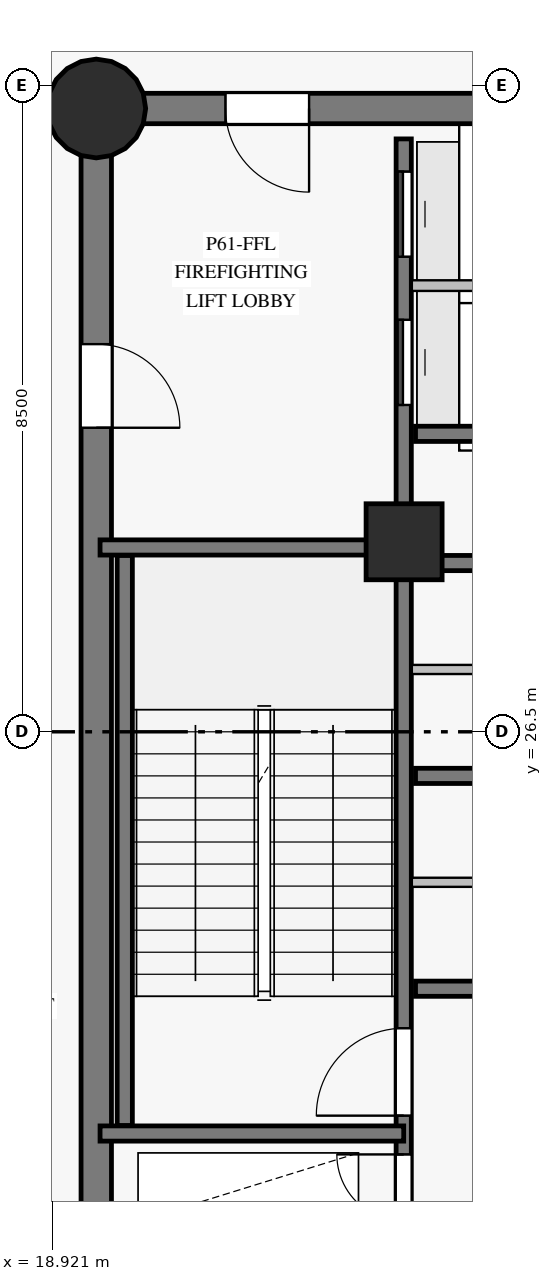
"""IFC4 building model, lengths in metres.
Left out: names, types, materials, properties, quantities, classifications, styles, units other than length and angle.
Written with IfcOpenShell. Run it as: python <this file> out.ifc"""

import sys

from ifc_helpers import new_model, si_unit, direction, frame, frame_2d, origin, origin_with_axes, origin_2d, place, context, subcontext, project, spatial, rectangle, circle, extrude, source, transform, mapped, element, fill, save


model = new_model("IFC4")
c1 = context("Model", 3, precision=1e-05, world=origin(), true_north=direction((0.0, 1.0)))
c2 = subcontext(c1, "Body", "Model", "MODEL_VIEW")
j1 = project(units=[si_unit("LENGTHUNIT", "METRE"), si_unit("PLANEANGLEUNIT", "RADIAN")], contexts=[c1])
p1 = place(None, origin())
s1 = spatial("IfcSite", under=j1, at=p1, CompositionType="ELEMENT")
p2 = place(p1, origin())
s2 = spatial("IfcBuilding", under=s1, at=p2, CompositionType="ELEMENT")
p3 = place(p2, frame((0.0, 0.0, 208.4)))
s3 = spatial("IfcBuildingStorey", under=s2, at=p3, CompositionType="ELEMENT", Elevation=208.4)
p4 = place(p3, frame((26.55, 34.7, 0.0), z_axis=(0.0, 0.0, 1.0), x_axis=(-1.0, 0.0, 0.0)))
e1 = element("IfcWall", 1, at=p4, inside=s3, PredefinedType="SHEAR", context=c2, shape_type="SweptSolid", body=[
    extrude(rectangle(XDim=7.05, YDim=0.4, at=frame_2d((3.525, 0.0))), origin(), (0.0, 0.0, 1.0), 4.3),
])
p5 = place(p4, frame((4.25, 0.0, 0.0)))
e2 = element("IfcOpeningElement", 2, at=p5, cuts=e1, PredefinedType="OPENING", context=c2, shape_type="SweptSolid", body=[
    extrude(rectangle(XDim=1.1, YDim=2.15, at=frame_2d((0.55, 1.075))), frame((0.0, 0.21, 0.0), z_axis=(0.0, -1.0, 0.0), x_axis=(1.0, 0.0, 0.0)), (0.0, 0.0, 1.0), 0.42),
])
p6 = place(p3, frame((19.5, 34.7, 0.0), z_axis=(0.0, 0.0, 1.0), x_axis=(0.0, -1.0, 0.0)))
e3 = element("IfcWall", 3, at=p6, inside=s3, PredefinedType="SHEAR", context=c2, shape_type="SweptSolid", body=[
    extrude(rectangle(XDim=16.4, YDim=0.4, at=frame_2d((8.2, 0.0))), origin(), (0.0, 0.0, 1.0), 4.3),
])
p7 = place(p6, frame((3.1, 0.0, 0.0)))
e4 = element("IfcOpeningElement", 4, at=p7, cuts=e3, PredefinedType="OPENING", context=c2, shape_type="SweptSolid", body=[
    extrude(rectangle(XDim=1.1, YDim=2.15, at=frame_2d((0.55, 1.075))), frame((0.0, 0.21, 0.0), z_axis=(0.0, -1.0, 0.0), x_axis=(1.0, 0.0, 0.0)), (0.0, 0.0, 1.0), 0.42),
])
m1 = source(origin_with_axes(), c2, "Body", "SweptSolid", [
    extrude(circle(Radius=0.65, at=origin_2d()), origin(), (0.0, 0.0, 1.0), 4.5),
])
p8 = place(p3, frame((19.5, 34.7, 0.0), z_axis=(0.0, 0.0, 1.0), x_axis=(1.0, 0.0, 0.0)))
e5 = element("IfcColumn", 5, at=p8, inside=s3, PredefinedType="COLUMN", context=c2, shape_type="MappedRepresentation", body=[
    mapped(m1, transform((0.0, 0.0, 0.0), scale=1.0)),
])
m2 = source(origin_with_axes(), c2, "Body", "SweptSolid", [
    extrude(rectangle(XDim=1.0, YDim=1.0, at=origin_2d()), origin(), (0.0, 0.0, 1.0), 4.5),
])
p9 = place(p3, frame((23.55, 29.0, 0.0), z_axis=(0.0, 0.0, 1.0), x_axis=(1.0, 0.0, 0.0)))
e6 = element("IfcColumn", 6, at=p9, inside=s3, PredefinedType="COLUMN", context=c2, shape_type="MappedRepresentation", body=[
    mapped(m2, transform((0.0, 0.0, 0.0), scale=1.0)),
])
p10 = place(p3, frame((23.545, 18.7, 0.0), z_axis=(0.0, 0.0, 1.0), x_axis=(0.0, 1.0, 0.0)))
e7 = element("IfcWall", 7, at=p10, inside=s3, PredefinedType="SHEAR", context=c2, shape_type="SweptSolid", body=[
    extrude(rectangle(XDim=15.6, YDim=0.2, at=frame_2d((7.8, 0.0))), origin(), (0.0, 0.0, 1.0), 4.3),
])
p11 = place(p10, frame((2.75, 0.0, 0.0)))
e8 = element("IfcOpeningElement", 8, at=p11, cuts=e7, PredefinedType="OPENING", context=c2, shape_type="SweptSolid", body=[
    extrude(rectangle(XDim=1.15, YDim=2.15, at=frame_2d((0.575, 1.075))), frame((0.0, 0.11, 0.0), z_axis=(0.0, -1.0, 0.0), x_axis=(1.0, 0.0, 0.0)), (0.0, 0.0, 1.0), 0.22),
])
p12 = place(p10, frame((0.14, 0.0, 0.0)))
e9 = element("IfcOpeningElement", 9, at=p12, cuts=e7, PredefinedType="OPENING", context=c2, shape_type="SweptSolid", body=[
    extrude(rectangle(XDim=0.88, YDim=2.1, at=frame_2d((0.44, 1.05))), frame((0.0, 0.11, 0.0), z_axis=(0.0, -1.0, 0.0), x_axis=(1.0, 0.0, 0.0)), (0.0, 0.0, 1.0), 0.22),
])
p13 = place(p10, frame((1.36, 0.0, 0.0)))
e10 = element("IfcOpeningElement", 10, at=p13, cuts=e7, PredefinedType="OPENING", context=c2, shape_type="SweptSolid", body=[
    extrude(rectangle(XDim=0.88, YDim=2.1, at=frame_2d((0.44, 1.05))), frame((0.0, 0.11, 0.0), z_axis=(0.0, -1.0, 0.0), x_axis=(1.0, 0.0, 0.0)), (0.0, 0.0, 1.0), 0.22),
])
p14 = place(p10, frame((12.1, 0.0, 0.0)))
e11 = element("IfcOpeningElement", 11, at=p14, cuts=e7, PredefinedType="OPENING", context=c2, shape_type="SweptSolid", body=[
    extrude(rectangle(XDim=1.12, YDim=2.15, at=frame_2d((0.56, 1.075))), frame((0.0, 0.11, 0.0), z_axis=(0.0, -1.0, 0.0), x_axis=(1.0, 0.0, 0.0)), (0.0, 0.0, 1.0), 0.22),
])
p15 = place(p10, frame((14.05, 0.0, 0.0)))
e12 = element("IfcOpeningElement", 12, at=p15, cuts=e7, PredefinedType="OPENING", context=c2, shape_type="SweptSolid", body=[
    extrude(rectangle(XDim=1.12, YDim=2.15, at=frame_2d((0.56, 1.075))), frame((0.0, 0.11, 0.0), z_axis=(0.0, -1.0, 0.0), x_axis=(1.0, 0.0, 0.0)), (0.0, 0.0, 1.0), 0.22),
])
p16 = place(p3, frame((23.7, 23.12, 0.0), z_axis=(0.0, 0.0, 1.0), x_axis=(1.0, 0.0, 0.0)))
e13 = element("IfcWall", 13, at=p16, inside=s3, PredefinedType="SHEAR", context=c2, shape_type="SweptSolid", body=[
    extrude(rectangle(XDim=9.6, YDim=0.2, at=frame_2d((4.8, 0.0))), origin(), (0.0, 0.0, 1.0), 4.3),
])
p17 = place(p16, frame((2.4, 0.0, 0.0)))
e14 = element("IfcOpeningElement", 14, at=p17, cuts=e13, PredefinedType="OPENING", context=c2, shape_type="SweptSolid", body=[
    extrude(rectangle(XDim=1.0, YDim=2.15, at=frame_2d((0.5, 1.075))), frame((0.0, 0.11, 0.0), z_axis=(0.0, -1.0, 0.0), x_axis=(1.0, 0.0, 0.0)), (0.0, 0.0, 1.0), 0.22),
])
p18 = place(p3, frame((23.7, 25.92, 0.0), z_axis=(0.0, 0.0, 1.0), x_axis=(1.0, 0.0, 0.0)))
e15 = element("IfcWall", 15, at=p18, inside=s3, PredefinedType="SHEAR", context=c2, shape_type="SweptSolid", body=[
    extrude(rectangle(XDim=9.6, YDim=0.2, at=frame_2d((4.8, 0.0))), origin(), (0.0, 0.0, 1.0), 4.3),
])
p19 = place(p3, frame((23.7, 28.72, 0.0), z_axis=(0.0, 0.0, 1.0), x_axis=(1.0, 0.0, 0.0)))
e16 = element("IfcWall", 16, at=p19, inside=s3, PredefinedType="SHEAR", context=c2, shape_type="SweptSolid", body=[
    extrude(rectangle(XDim=9.6, YDim=0.2, at=frame_2d((4.8, 0.0))), origin(), (0.0, 0.0, 1.0), 4.3),
])
p20 = place(p19, frame((2.4, 0.0, 0.0)))
e17 = element("IfcOpeningElement", 17, at=p20, cuts=e16, PredefinedType="OPENING", context=c2, shape_type="SweptSolid", body=[
    extrude(rectangle(XDim=1.0, YDim=2.15, at=frame_2d((0.5, 1.075))), frame((0.0, 0.11, 0.0), z_axis=(0.0, -1.0, 0.0), x_axis=(1.0, 0.0, 0.0)), (0.0, 0.0, 1.0), 0.22),
])
p21 = place(p3, frame((19.875, 21.32, 0.0), z_axis=(0.0, 0.0, 1.0), x_axis=(0.0, 1.0, 0.0)))
e18 = element("IfcWall", 18, at=p21, inside=s3, PredefinedType="SHEAR", context=c2, shape_type="SweptSolid", body=[
    extrude(rectangle(XDim=7.5, YDim=0.2, at=frame_2d((3.75, 0.0))), origin(), (0.0, 0.0, 1.0), 4.3),
])
for number, where, z_axis, x_axis in (
    (19, (19.55, 21.215, 0.0), (0.0, 0.0, 1.0), (1.0, 0.0, 0.0)),
    (20, (19.55, 28.925, 0.0), (0.0, 0.0, 1.0), (1.0, 0.0, 0.0)),
):
    element("IfcWall", number, at=place(p3, frame(where, z_axis=z_axis, x_axis=x_axis)), inside=s3, PredefinedType="SHEAR", context=c2, shape_type="SweptSolid", body=[
        extrude(rectangle(XDim=3.995, YDim=0.2, at=frame_2d((1.998, 0.0))), origin(), (0.0, 0.0, 1.0), 4.3),
    ])
p22 = place(p3, frame((23.7, 30.42, 0.0), z_axis=(0.0, 0.0, 1.0), x_axis=(1.0, 0.0, 0.0)))
e21 = element("IfcWall", 21, at=p22, inside=s3, PredefinedType="SHEAR", context=c2, shape_type="SweptSolid", body=[
    extrude(rectangle(XDim=2.78, YDim=0.2, at=frame_2d((1.39, 0.0))), origin(), (0.0, 0.0, 1.0), 4.3),
])
p23 = place(p3, frame((23.652, 24.52, 0.0), z_axis=(0.0, 0.0, 1.0), x_axis=(1.0, 0.0, 0.0)))
e22 = element("IfcWall", 22, at=p23, inside=s3, PredefinedType="PARTITIONING", context=c2, shape_type="SweptSolid", body=[
    extrude(rectangle(XDim=9.698, YDim=0.12, at=frame_2d((4.849, 0.0))), origin(), (0.0, 0.0, 1.0), 4.3),
])
p24 = place(p23, frame((4.2, 0.0, 0.0)))
e23 = element("IfcOpeningElement", 23, at=p24, cuts=e22, PredefinedType="OPENING", context=c2, shape_type="SweptSolid", body=[
    extrude(rectangle(XDim=0.94, YDim=2.1, at=frame_2d((0.47, 1.05))), frame((0.0, 0.07, 0.0), z_axis=(0.0, -1.0, 0.0), x_axis=(1.0, 0.0, 0.0)), (0.0, 0.0, 1.0), 0.14),
])
p25 = place(p3, frame((23.652, 27.32, 0.0), z_axis=(0.0, 0.0, 1.0), x_axis=(1.0, 0.0, 0.0)))
e24 = element("IfcWall", 24, at=p25, inside=s3, PredefinedType="PARTITIONING", context=c2, shape_type="SweptSolid", body=[
    extrude(rectangle(XDim=9.698, YDim=0.12, at=frame_2d((4.849, 0.0))), origin(), (0.0, 0.0, 1.0), 4.3),
])
p26 = place(p25, frame((4.2, 0.0, 0.0)))
e25 = element("IfcOpeningElement", 25, at=p26, cuts=e24, PredefinedType="OPENING", context=c2, shape_type="SweptSolid", body=[
    extrude(rectangle(XDim=0.94, YDim=2.1, at=frame_2d((0.47, 1.05))), frame((0.0, 0.07, 0.0), z_axis=(0.0, -1.0, 0.0), x_axis=(1.0, 0.0, 0.0)), (0.0, 0.0, 1.0), 0.14),
])
p27 = place(p3, frame((23.652, 32.37, 0.0), z_axis=(0.0, 0.0, 1.0), x_axis=(1.0, 0.0, 0.0)))
e26 = element("IfcWall", 26, at=p27, inside=s3, PredefinedType="PARTITIONING", context=c2, shape_type="SweptSolid", body=[
    extrude(rectangle(XDim=2.828, YDim=0.14, at=frame_2d((1.414, 0.0))), origin(), (0.0, 0.0, 1.0), 4.3),
])
m3 = source(origin_with_axes(), c2, "Body", "SweptSolid", [
    extrude(rectangle(XDim=1.15, YDim=2.15, at=frame_2d((0.575, 1.075))), frame((0.0, 0.025, 0.0), z_axis=(0.0, -1.0, 0.0), x_axis=(1.0, 0.0, 0.0)), (0.0, 0.0, 1.0), 0.05),
])
p28 = place(p11, origin())
e27 = element("IfcDoor", 27, at=p28, inside=s3, OperationType="SINGLE_SWING_LEFT", PredefinedType="DOOR", context=c2, shape_type="MappedRepresentation", body=[
    mapped(m3, transform((0.0, 0.0, 0.0), scale=1.0)),
])
fill(e8, e27)
m4 = source(origin_with_axes(), c2, "Body", "SweptSolid", [
    extrude(rectangle(XDim=1.1, YDim=2.15, at=frame_2d((0.55, 1.075))), frame((0.0, 0.025, 0.0), z_axis=(0.0, -1.0, 0.0), x_axis=(1.0, 0.0, 0.0)), (0.0, 0.0, 1.0), 0.05),
])
p29 = place(p5, origin())
e28 = element("IfcDoor", 28, at=p29, inside=s3, OperationType="SINGLE_SWING_LEFT", PredefinedType="DOOR", context=c2, shape_type="MappedRepresentation", body=[
    mapped(m4, transform((0.0, 0.0, 0.0), scale=1.0)),
])
fill(e2, e28)
p30 = place(p7, origin())
e29 = element("IfcDoor", 29, at=p30, inside=s3, OperationType="SINGLE_SWING_RIGHT", PredefinedType="DOOR", context=c2, shape_type="MappedRepresentation", body=[
    mapped(m4, transform((0.0, 0.0, 0.0), scale=1.0)),
])
fill(e4, e29)
m5 = source(origin_with_axes(), c2, "Body", "SweptSolid", [
    extrude(rectangle(XDim=0.88, YDim=2.1, at=frame_2d((0.44, 1.05))), frame((0.0, 0.025, 0.0), z_axis=(0.0, -1.0, 0.0), x_axis=(1.0, 0.0, 0.0)), (0.0, 0.0, 1.0), 0.05),
])
p31 = place(p13, origin())
e30 = element("IfcDoor", 30, at=p31, inside=s3, OperationType="SINGLE_SWING_RIGHT", PredefinedType="DOOR", context=c2, shape_type="MappedRepresentation", body=[
    mapped(m5, transform((0.0, 0.0, 0.0), scale=1.0)),
])
fill(e10, e30)
m6 = source(origin_with_axes(), c2, "Body", "SweptSolid", [
    extrude(rectangle(XDim=1.12, YDim=2.15, at=frame_2d((0.56, 1.075))), frame((0.0, 0.025, 0.0), z_axis=(0.0, -1.0, 0.0), x_axis=(1.0, 0.0, 0.0)), (0.0, 0.0, 1.0), 0.05),
])
p32 = place(p14, origin())
e31 = element("IfcDoor", 31, at=p32, inside=s3, OperationType="SLIDING_TO_LEFT", PredefinedType="DOOR", context=c2, shape_type="MappedRepresentation", body=[
    mapped(m6, transform((0.0, 0.0, 0.0), scale=1.0)),
])
fill(e11, e31)
p33 = place(p15, origin())
e32 = element("IfcDoor", 32, at=p33, inside=s3, OperationType="SLIDING_TO_RIGHT", PredefinedType="DOOR", context=c2, shape_type="MappedRepresentation", body=[
    mapped(m6, transform((0.0, 0.0, 0.0), scale=1.0)),
])
fill(e12, e32)
save(model, sys.argv[1])
